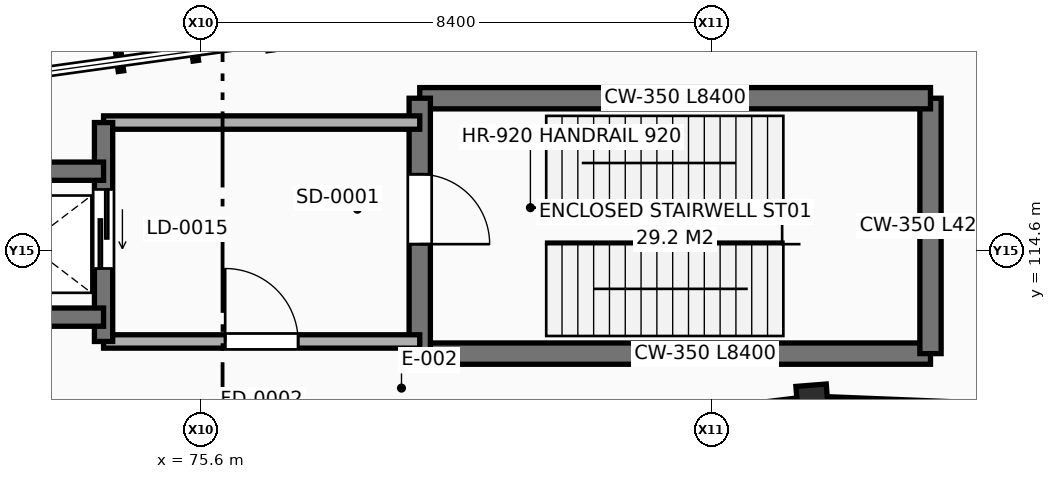
"""IFC4 building model, lengths in metres.
Left out: names, types, materials, properties, quantities, classifications, styles, units other than length and angle.
Written with IfcOpenShell. Run it as: python <this file> out.ifc"""

import sys

from ifc_helpers import new_model, si_unit, direction, frame, frame_2d, origin, origin_2d, place, context, subcontext, project, spatial, rectangle, extrude, element, fill, save


model = new_model("IFC4")
c1 = context("Model", 3, precision=1e-05, world=origin(), true_north=direction((0.0, 1.0)))
c2 = subcontext(c1, "Body", "Model", "MODEL_VIEW")
j1 = project(units=[si_unit("LENGTHUNIT", "METRE"), si_unit("PLANEANGLEUNIT", "RADIAN")], contexts=[c1])
p1 = place(None, origin())
s1 = spatial("IfcSite", under=j1, at=p1, CompositionType="ELEMENT")
p2 = place(p1, origin())
s2 = spatial("IfcBuilding", under=s1, at=p2, CompositionType="ELEMENT")
p3 = place(p2, origin())
s3 = spatial("IfcBuildingStorey", under=s2, at=p3, CompositionType="ELEMENT", Elevation=0.0)
p4 = place(p3, frame((85.664, 112.031, 0.0), z_axis=(0.0, 0.0, 1.0), x_axis=(-0.078459095728, 0.996917333733, 0.0)))
e1 = element("IfcColumn", 1, at=p4, inside=s3, PredefinedType="COLUMN", context=c2, shape_type="SweptSolid", body=[
    extrude(rectangle(XDim=0.7, YDim=0.5, at=origin_2d()), origin(), (0.0, 0.0, 1.0), 5.4),
])
p5 = place(p3, frame((99.01, 111.496, 0.0), z_axis=(0.0, 0.0, 1.0), x_axis=(-0.999197911134, 0.040044155435, 0.0)))
e2 = element("IfcWall", 2, at=p5, inside=s3, PredefinedType="SOLIDWALL", context=c2, shape_type="SweptSolid", body=[
    extrude(rectangle(XDim=13.065, YDim=0.34, at=frame_2d((6.533, 0.0))), origin(), (0.0, 0.0, 1.0), 4.587),
])
p6 = place(p5, frame((3.355, 0.0, 0.9)))
e3 = element("IfcOpeningElement", 3, at=p6, cuts=e2, PredefinedType="OPENING", context=c2, shape_type="SweptSolid", body=[
    extrude(rectangle(XDim=1.5, YDim=2.1, at=frame_2d((0.75, 1.05))), frame((0.0, 0.18, 0.0), z_axis=(0.0, -1.0, 0.0), x_axis=(1.0, 0.0, 0.0)), (0.0, 0.0, 1.0), 0.36),
])
p7 = place(p5, frame((8.21, 0.0, 0.9)))
e4 = element("IfcOpeningElement", 4, at=p7, cuts=e2, PredefinedType="OPENING", context=c2, shape_type="SweptSolid", body=[
    extrude(rectangle(XDim=1.5, YDim=2.1, at=frame_2d((0.75, 1.05))), frame((0.0, 0.18, 0.0), z_axis=(0.0, -1.0, 0.0), x_axis=(1.0, 0.0, 0.0)), (0.0, 0.0, 1.0), 0.36),
])
p8 = place(p3, frame((85.399, 111.999, 0.0), z_axis=(0.0, 0.0, 1.0), x_axis=(-0.992613415979, -0.121320263845, 0.0)))
e5 = element("IfcWall", 5, at=p8, inside=s3, PredefinedType="SOLIDWALL", context=c2, shape_type="SweptSolid", body=[
    extrude(rectangle(XDim=12.821, YDim=0.34, at=frame_2d((6.41, 0.0))), origin(), (0.0, 0.0, 1.0), 4.587),
])
p9 = place(p8, frame((5.41, 0.0, 0.0)))
e6 = element("IfcOpeningElement", 6, at=p9, cuts=e5, PredefinedType="OPENING", context=c2, shape_type="SweptSolid", body=[
    extrude(rectangle(XDim=2.0, YDim=2.5, at=frame_2d((1.0, 1.25))), frame((0.0, 0.18, 0.0), z_axis=(0.0, -1.0, 0.0), x_axis=(1.0, 0.0, 0.0)), (0.0, 0.0, 1.0), 0.36),
])
p10 = place(p3, frame((79.2, 112.9, 0.0), z_axis=(0.0, 0.0, 1.0), x_axis=(1.0, 0.0, 0.0)))
e7 = element("IfcWall", 7, at=p10, inside=s3, PredefinedType="SHEAR", context=c2, shape_type="SweptSolid", body=[
    extrude(rectangle(XDim=8.4, YDim=0.35, at=frame_2d((4.2, 0.0))), origin(), (0.0, 0.0, 1.0), 5.12),
])
p11 = place(p3, frame((87.6, 112.9, 0.0), z_axis=(0.0, 0.0, 1.0), x_axis=(0.0, 1.0, 0.0)))
e8 = element("IfcWall", 8, at=p11, inside=s3, PredefinedType="SHEAR", context=c2, shape_type="SweptSolid", body=[
    extrude(rectangle(XDim=4.2, YDim=0.35, at=frame_2d((2.1, 0.0))), origin(), (0.0, 0.0, 1.0), 5.12),
])
p12 = place(p3, frame((87.6, 117.1, 0.0), z_axis=(0.0, 0.0, 1.0), x_axis=(-1.0, 0.0, 0.0)))
e9 = element("IfcWall", 9, at=p12, inside=s3, PredefinedType="SHEAR", context=c2, shape_type="SweptSolid", body=[
    extrude(rectangle(XDim=8.4, YDim=0.35, at=frame_2d((4.2, 0.0))), origin(), (0.0, 0.0, 1.0), 5.12),
])
p13 = place(p3, frame((79.2, 117.1, 0.0), z_axis=(0.0, 0.0, 1.0), x_axis=(0.0, -1.0, 0.0)))
e10 = element("IfcWall", 10, at=p13, inside=s3, PredefinedType="SHEAR", context=c2, shape_type="SweptSolid", body=[
    extrude(rectangle(XDim=4.2, YDim=0.35, at=frame_2d((2.1, 0.0))), origin(), (0.0, 0.0, 1.0), 5.12),
])
p14 = place(p13, frame((1.25, 0.0, 0.0)))
e11 = element("IfcOpeningElement", 11, at=p14, cuts=e10, PredefinedType="OPENING", context=c2, shape_type="SweptSolid", body=[
    extrude(rectangle(XDim=1.15, YDim=2.2, at=frame_2d((0.575, 1.1))), frame((0.0, 0.185, 0.0), z_axis=(0.0, -1.0, 0.0), x_axis=(1.0, 0.0, 0.0)), (0.0, 0.0, 1.0), 0.37),
])
p15 = place(p3, frame((74.0, 113.1, 0.0), z_axis=(0.0, 0.0, 1.0), x_axis=(1.0, 0.0, 0.0)))
e12 = element("IfcWall", 12, at=p15, inside=s3, PredefinedType="SOLIDWALL", context=c2, shape_type="SweptSolid", body=[
    extrude(rectangle(XDim=5.2, YDim=0.22, at=frame_2d((2.6, 0.0))), origin(), (0.0, 0.0, 1.0), 5.12),
])
p16 = place(p15, frame((2.0, 0.0, 0.0)))
e13 = element("IfcOpeningElement", 13, at=p16, cuts=e12, PredefinedType="OPENING", context=c2, shape_type="SweptSolid", body=[
    extrude(rectangle(XDim=1.2, YDim=2.2, at=frame_2d((0.6, 1.1))), frame((0.0, 0.12, 0.0), z_axis=(0.0, -1.0, 0.0), x_axis=(1.0, 0.0, 0.0)), (0.0, 0.0, 1.0), 0.24),
])
p17 = place(p3, frame((79.2, 116.7, 0.0), z_axis=(0.0, 0.0, 1.0), x_axis=(-1.0, 0.0, 0.0)))
e14 = element("IfcWall", 14, at=p17, inside=s3, PredefinedType="SOLIDWALL", context=c2, shape_type="SweptSolid", body=[
    extrude(rectangle(XDim=5.2, YDim=0.22, at=frame_2d((2.6, 0.0))), origin(), (0.0, 0.0, 1.0), 5.12),
])
p18 = place(p3, frame((74.0, 116.7, 0.0), z_axis=(0.0, 0.0, 1.0), x_axis=(0.0, -1.0, 0.0)))
e15 = element("IfcWall", 15, at=p18, inside=s3, PredefinedType="SHEAR", context=c2, shape_type="SweptSolid", body=[
    extrude(rectangle(XDim=3.6, YDim=0.3, at=frame_2d((1.8, 0.0))), origin(), (0.0, 0.0, 1.0), 5.12),
])
p19 = place(p18, frame((1.1, 0.0, 0.0)))
e16 = element("IfcOpeningElement", 16, at=p19, cuts=e15, PredefinedType="OPENING", context=c2, shape_type="SweptSolid", body=[
    extrude(rectangle(XDim=1.3, YDim=2.3, at=frame_2d((0.65, 1.15))), frame((0.0, 0.16, 0.0), z_axis=(0.0, -1.0, 0.0), x_axis=(1.0, 0.0, 0.0)), (0.0, 0.0, 1.0), 0.32),
])
for number, where, z_axis, x_axis in (
    (17, (74.0, 115.9, 0.0), (0.0, 0.0, 1.0), (-1.0, 0.0, 0.0)),
    (18, (71.5, 113.5, 0.0), (0.0, 0.0, 1.0), (1.0, 0.0, 0.0)),
):
    element("IfcWall", number, at=place(p3, frame(where, z_axis=z_axis, x_axis=x_axis)), inside=s3, PredefinedType="SHEAR", context=c2, shape_type="SweptSolid", body=[
        extrude(rectangle(XDim=2.5, YDim=0.3, at=frame_2d((1.25, 0.0))), origin(), (0.0, 0.0, 1.0), 5.12),
    ])
p20 = place(p14, frame((1.15, 0.0, 0.0), z_axis=(0.0, 0.0, 1.0), x_axis=(-1.0, 0.0, 0.0)))
e19 = element("IfcDoor", 19, at=p20, inside=s3, OperationType="SINGLE_SWING_RIGHT", PredefinedType="DOOR", context=c2, shape_type="SweptSolid", body=[
    extrude(rectangle(XDim=1.15, YDim=2.2, at=frame_2d((0.575, 1.1))), frame((0.0, 0.025, 0.0), z_axis=(0.0, -1.0, 0.0), x_axis=(1.0, 0.0, 0.0)), (0.0, 0.0, 1.0), 0.05),
])
fill(e11, e19)
p21 = place(p16, origin())
e20 = element("IfcDoor", 20, at=p21, inside=s3, OperationType="SINGLE_SWING_LEFT", PredefinedType="DOOR", context=c2, shape_type="SweptSolid", body=[
    extrude(rectangle(XDim=1.2, YDim=2.2, at=frame_2d((0.6, 1.1))), frame((0.0, 0.025, 0.0), z_axis=(0.0, -1.0, 0.0), x_axis=(1.0, 0.0, 0.0)), (0.0, 0.0, 1.0), 0.05),
])
fill(e13, e20)
p22 = place(p19, origin())
e21 = element("IfcDoor", 21, at=p22, inside=s3, OperationType="SLIDING_TO_LEFT", PredefinedType="DOOR", context=c2, shape_type="SweptSolid", body=[
    extrude(rectangle(XDim=1.3, YDim=2.3, at=frame_2d((0.65, 1.15))), frame((0.0, 0.025, 0.0), z_axis=(0.0, -1.0, 0.0), x_axis=(1.0, 0.0, 0.0)), (0.0, 0.0, 1.0), 0.05),
])
fill(e16, e21)
save(model, sys.argv[1])
